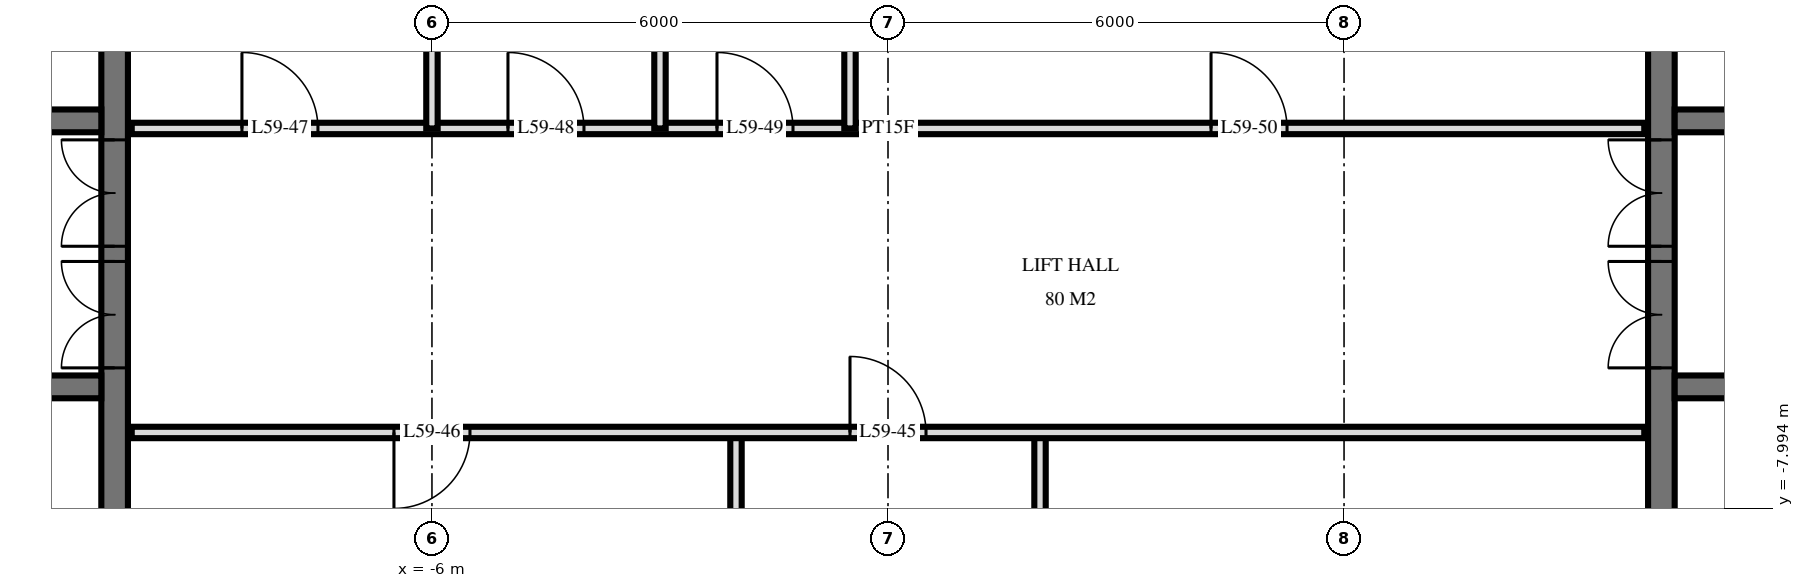
"""IFC4 building model, lengths in metres.
Left out: names, types, materials, properties, quantities, classifications, styles, units other than length and angle.
Written with IfcOpenShell. Run it as: python <this file> out.ifc"""

import sys

from ifc_helpers import new_model, si_unit, direction, frame, frame_2d, origin, place, context, subcontext, project, spatial, rectangle, extrude, element, fill, save


model = new_model("IFC4")
c1 = context("Model", 3, precision=1e-05, world=origin(), true_north=direction((0.0, 1.0)))
c2 = subcontext(c1, "Body", "Model", "MODEL_VIEW")
j1 = project(units=[si_unit("LENGTHUNIT", "METRE"), si_unit("PLANEANGLEUNIT", "RADIAN")], contexts=[c1])
p1 = place(None, origin())
s1 = spatial("IfcSite", under=j1, at=p1, CompositionType="ELEMENT")
p2 = place(p1, origin())
s2 = spatial("IfcBuilding", under=s1, at=p2, CompositionType="ELEMENT")
p3 = place(p2, frame((0.0, 0.0, 225.6)))
s3 = spatial("IfcBuildingStorey", under=s2, at=p3, CompositionType="ELEMENT", Elevation=225.6)
p4 = place(p3, frame((-10.175, -14.55, 0.0), z_axis=(0.0, 0.0, 1.0), x_axis=(0.0, 1.0, 0.0)))
e1 = element("IfcWall", 1, at=p4, inside=s3, PredefinedType="SHEAR", context=c2, shape_type="SweptSolid", body=[
    extrude(rectangle(XDim=14.1, YDim=0.35, at=frame_2d((7.05, 0.0))), origin(), (0.0, 0.0, 1.0), 3.5),
])
p5 = place(p4, frame((8.4, 0.0, 0.0)))
e2 = element("IfcOpeningElement", 2, at=p5, cuts=e1, PredefinedType="OPENING", context=c2, shape_type="SweptSolid", body=[
    extrude(rectangle(XDim=1.4, YDim=2.4, at=frame_2d((0.7, 1.2))), frame((0.0, 0.185, 0.0), z_axis=(0.0, -1.0, 0.0), x_axis=(1.0, 0.0, 0.0)), (0.0, 0.0, 1.0), 0.37),
])
p6 = place(p4, frame((10.0, 0.0, 0.0)))
e3 = element("IfcOpeningElement", 3, at=p6, cuts=e1, PredefinedType="OPENING", context=c2, shape_type="SweptSolid", body=[
    extrude(rectangle(XDim=1.4, YDim=2.4, at=frame_2d((0.7, 1.2))), frame((0.0, 0.185, 0.0), z_axis=(0.0, -1.0, 0.0), x_axis=(1.0, 0.0, 0.0)), (0.0, 0.0, 1.0), 0.37),
])
p7 = place(p4, frame((4.0, 0.0, 0.0)))
e4 = element("IfcOpeningElement", 4, at=p7, cuts=e1, PredefinedType="OPENING", context=c2, shape_type="SweptSolid", body=[
    extrude(rectangle(XDim=1.2, YDim=2.1, at=frame_2d((0.6, 1.05))), frame((0.0, 0.185, 0.0), z_axis=(0.0, -1.0, 0.0), x_axis=(1.0, 0.0, 0.0)), (0.0, 0.0, 1.0), 0.37),
])
p8 = place(p3, frame((-24.05, -2.9, 0.0), z_axis=(0.0, 0.0, 1.0), x_axis=(1.0, 0.0, 0.0)))
e5 = element("IfcWall", 5, at=p8, inside=s3, PredefinedType="SHEAR", context=c2, shape_type="SweptSolid", body=[
    extrude(rectangle(XDim=13.7, YDim=0.3, at=frame_2d((6.85, 0.0))), origin(), (0.0, 0.0, 1.0), 3.5),
])
p9 = place(p8, frame((0.55, 0.0, 0.0)))
e6 = element("IfcOpeningElement", 6, at=p9, cuts=e5, PredefinedType="OPENING", context=c2, shape_type="SweptSolid", body=[
    extrude(rectangle(XDim=1.1, YDim=2.1, at=frame_2d((0.55, 1.05))), frame((0.0, 0.16, 0.0), z_axis=(0.0, -1.0, 0.0), x_axis=(1.0, 0.0, 0.0)), (0.0, 0.0, 1.0), 0.32),
])
p10 = place(p8, frame((5.9, 0.0, 0.0)))
e7 = element("IfcOpeningElement", 7, at=p10, cuts=e5, PredefinedType="OPENING", context=c2, shape_type="SweptSolid", body=[
    extrude(rectangle(XDim=0.9, YDim=2.1, at=frame_2d((0.45, 1.05))), frame((0.0, 0.16, 0.0), z_axis=(0.0, -1.0, 0.0), x_axis=(1.0, 0.0, 0.0)), (0.0, 0.0, 1.0), 0.32),
])
p11 = place(p8, frame((11.85, 0.0, 0.0)))
e8 = element("IfcOpeningElement", 8, at=p11, cuts=e5, PredefinedType="OPENING", context=c2, shape_type="SweptSolid", body=[
    extrude(rectangle(XDim=1.0, YDim=2.1, at=frame_2d((0.5, 1.05))), frame((0.0, 0.16, 0.0), z_axis=(0.0, -1.0, 0.0), x_axis=(1.0, 0.0, 0.0)), (0.0, 0.0, 1.0), 0.32),
])
p12 = place(p8, frame((9.312, 0.0, 0.0)))
e9 = element("IfcOpeningElement", 9, at=p12, cuts=e5, PredefinedType="OPENING", context=c2, shape_type="SweptSolid", body=[
    extrude(rectangle(XDim=1.0, YDim=2.1, at=frame_2d((0.5, 1.05))), frame((0.0, 0.16, 0.0), z_axis=(0.0, -1.0, 0.0), x_axis=(1.0, 0.0, 0.0)), (0.0, 0.0, 1.0), 0.32),
])
p13 = place(p8, frame((7.887, 0.0, 0.0)))
e10 = element("IfcOpeningElement", 10, at=p13, cuts=e5, PredefinedType="OPENING", context=c2, shape_type="SweptSolid", body=[
    extrude(rectangle(XDim=1.0, YDim=2.1, at=frame_2d((0.5, 1.05))), frame((0.0, 0.16, 0.0), z_axis=(0.0, -1.0, 0.0), x_axis=(1.0, 0.0, 0.0)), (0.0, 0.0, 1.0), 0.32),
])
p14 = place(p8, frame((3.0, 0.0, 0.0)))
e11 = element("IfcOpeningElement", 11, at=p14, cuts=e5, PredefinedType="OPENING", context=c2, shape_type="SweptSolid", body=[
    extrude(rectangle(XDim=1.0, YDim=2.1, at=frame_2d((0.5, 1.05))), frame((0.0, 0.16, 0.0), z_axis=(0.0, -1.0, 0.0), x_axis=(1.0, 0.0, 0.0)), (0.0, 0.0, 1.0), 0.32),
])
p15 = place(p3, frame((-24.05, -6.4, 0.0), z_axis=(0.0, 0.0, 1.0), x_axis=(1.0, 0.0, 0.0)))
e12 = element("IfcWall", 12, at=p15, inside=s3, PredefinedType="SHEAR", context=c2, shape_type="SweptSolid", body=[
    extrude(rectangle(XDim=13.7, YDim=0.3, at=frame_2d((6.85, 0.0))), origin(), (0.0, 0.0, 1.0), 3.5),
])
p16 = place(p15, frame((0.55, 0.0, 0.0)))
e13 = element("IfcOpeningElement", 13, at=p16, cuts=e12, PredefinedType="OPENING", context=c2, shape_type="SweptSolid", body=[
    extrude(rectangle(XDim=1.1, YDim=2.1, at=frame_2d((0.55, 1.05))), frame((0.0, 0.16, 0.0), z_axis=(0.0, -1.0, 0.0), x_axis=(1.0, 0.0, 0.0)), (0.0, 0.0, 1.0), 0.32),
])
p17 = place(p15, frame((5.8, 0.0, 0.0)))
e14 = element("IfcOpeningElement", 14, at=p17, cuts=e12, PredefinedType="OPENING", context=c2, shape_type="SweptSolid", body=[
    extrude(rectangle(XDim=1.1, YDim=2.1, at=frame_2d((0.55, 1.05))), frame((0.0, 0.16, 0.0), z_axis=(0.0, -1.0, 0.0), x_axis=(1.0, 0.0, 0.0)), (0.0, 0.0, 1.0), 0.32),
])
p18 = place(p3, frame((10.175, -14.55, 0.0), z_axis=(0.0, 0.0, 1.0), x_axis=(0.0, 1.0, 0.0)))
e15 = element("IfcWall", 15, at=p18, inside=s3, PredefinedType="SHEAR", context=c2, shape_type="SweptSolid", body=[
    extrude(rectangle(XDim=14.1, YDim=0.35, at=frame_2d((7.05, 0.0))), origin(), (0.0, 0.0, 1.0), 3.5),
])
p19 = place(p18, frame((8.4, 0.0, 0.0)))
e16 = element("IfcOpeningElement", 16, at=p19, cuts=e15, PredefinedType="OPENING", context=c2, shape_type="SweptSolid", body=[
    extrude(rectangle(XDim=1.4, YDim=2.4, at=frame_2d((0.7, 1.2))), frame((0.0, 0.185, 0.0), z_axis=(0.0, -1.0, 0.0), x_axis=(1.0, 0.0, 0.0)), (0.0, 0.0, 1.0), 0.37),
])
p20 = place(p18, frame((10.0, 0.0, 0.0)))
e17 = element("IfcOpeningElement", 17, at=p20, cuts=e15, PredefinedType="OPENING", context=c2, shape_type="SweptSolid", body=[
    extrude(rectangle(XDim=1.4, YDim=2.4, at=frame_2d((0.7, 1.2))), frame((0.0, 0.185, 0.0), z_axis=(0.0, -1.0, 0.0), x_axis=(1.0, 0.0, 0.0)), (0.0, 0.0, 1.0), 0.37),
])
p21 = place(p18, frame((4.0, 0.0, 0.0)))
e18 = element("IfcOpeningElement", 18, at=p21, cuts=e15, PredefinedType="OPENING", context=c2, shape_type="SweptSolid", body=[
    extrude(rectangle(XDim=1.2, YDim=2.1, at=frame_2d((0.6, 1.05))), frame((0.0, 0.185, 0.0), z_axis=(0.0, -1.0, 0.0), x_axis=(1.0, 0.0, 0.0)), (0.0, 0.0, 1.0), 0.37),
])
p22 = place(p3, frame((10.35, -2.9, 0.0), z_axis=(0.0, 0.0, 1.0), x_axis=(1.0, 0.0, 0.0)))
e19 = element("IfcWall", 19, at=p22, inside=s3, PredefinedType="SHEAR", context=c2, shape_type="SweptSolid", body=[
    extrude(rectangle(XDim=13.7, YDim=0.3, at=frame_2d((6.85, 0.0))), origin(), (0.0, 0.0, 1.0), 3.5),
])
p23 = place(p22, frame((12.05, 0.0, 0.0)))
e20 = element("IfcOpeningElement", 20, at=p23, cuts=e19, PredefinedType="OPENING", context=c2, shape_type="SweptSolid", body=[
    extrude(rectangle(XDim=1.1, YDim=2.1, at=frame_2d((0.55, 1.05))), frame((0.0, 0.16, 0.0), z_axis=(0.0, -1.0, 0.0), x_axis=(1.0, 0.0, 0.0)), (0.0, 0.0, 1.0), 0.32),
])
p24 = place(p22, frame((6.9, 0.0, 0.0)))
e21 = element("IfcOpeningElement", 21, at=p24, cuts=e19, PredefinedType="OPENING", context=c2, shape_type="SweptSolid", body=[
    extrude(rectangle(XDim=0.9, YDim=2.1, at=frame_2d((0.45, 1.05))), frame((0.0, 0.16, 0.0), z_axis=(0.0, -1.0, 0.0), x_axis=(1.0, 0.0, 0.0)), (0.0, 0.0, 1.0), 0.32),
])
p25 = place(p22, frame((0.85, 0.0, 0.0)))
e22 = element("IfcOpeningElement", 22, at=p25, cuts=e19, PredefinedType="OPENING", context=c2, shape_type="SweptSolid", body=[
    extrude(rectangle(XDim=1.0, YDim=2.1, at=frame_2d((0.5, 1.05))), frame((0.0, 0.16, 0.0), z_axis=(0.0, -1.0, 0.0), x_axis=(1.0, 0.0, 0.0)), (0.0, 0.0, 1.0), 0.32),
])
p26 = place(p22, frame((3.387, 0.0, 0.0)))
e23 = element("IfcOpeningElement", 23, at=p26, cuts=e19, PredefinedType="OPENING", context=c2, shape_type="SweptSolid", body=[
    extrude(rectangle(XDim=1.0, YDim=2.1, at=frame_2d((0.5, 1.05))), frame((0.0, 0.16, 0.0), z_axis=(0.0, -1.0, 0.0), x_axis=(1.0, 0.0, 0.0)), (0.0, 0.0, 1.0), 0.32),
])
p27 = place(p22, frame((4.812, 0.0, 0.0)))
e24 = element("IfcOpeningElement", 24, at=p27, cuts=e19, PredefinedType="OPENING", context=c2, shape_type="SweptSolid", body=[
    extrude(rectangle(XDim=1.0, YDim=2.1, at=frame_2d((0.5, 1.05))), frame((0.0, 0.16, 0.0), z_axis=(0.0, -1.0, 0.0), x_axis=(1.0, 0.0, 0.0)), (0.0, 0.0, 1.0), 0.32),
])
p28 = place(p22, frame((9.7, 0.0, 0.0)))
e25 = element("IfcOpeningElement", 25, at=p28, cuts=e19, PredefinedType="OPENING", context=c2, shape_type="SweptSolid", body=[
    extrude(rectangle(XDim=1.0, YDim=2.1, at=frame_2d((0.5, 1.05))), frame((0.0, 0.16, 0.0), z_axis=(0.0, -1.0, 0.0), x_axis=(1.0, 0.0, 0.0)), (0.0, 0.0, 1.0), 0.32),
])
p29 = place(p3, frame((10.35, -6.4, 0.0), z_axis=(0.0, 0.0, 1.0), x_axis=(1.0, 0.0, 0.0)))
e26 = element("IfcWall", 26, at=p29, inside=s3, PredefinedType="SHEAR", context=c2, shape_type="SweptSolid", body=[
    extrude(rectangle(XDim=13.7, YDim=0.3, at=frame_2d((6.85, 0.0))), origin(), (0.0, 0.0, 1.0), 3.5),
])
p30 = place(p29, frame((12.05, 0.0, 0.0)))
e27 = element("IfcOpeningElement", 27, at=p30, cuts=e26, PredefinedType="OPENING", context=c2, shape_type="SweptSolid", body=[
    extrude(rectangle(XDim=1.1, YDim=2.1, at=frame_2d((0.55, 1.05))), frame((0.0, 0.16, 0.0), z_axis=(0.0, -1.0, 0.0), x_axis=(1.0, 0.0, 0.0)), (0.0, 0.0, 1.0), 0.32),
])
p31 = place(p29, frame((6.8, 0.0, 0.0)))
e28 = element("IfcOpeningElement", 28, at=p31, cuts=e26, PredefinedType="OPENING", context=c2, shape_type="SweptSolid", body=[
    extrude(rectangle(XDim=1.1, YDim=2.1, at=frame_2d((0.55, 1.05))), frame((0.0, 0.16, 0.0), z_axis=(0.0, -1.0, 0.0), x_axis=(1.0, 0.0, 0.0)), (0.0, 0.0, 1.0), 0.32),
])
p32 = place(p3, frame((2.0, -11.0, 0.0), z_axis=(0.0, 0.0, 1.0), x_axis=(0.0, 1.0, 0.0)))
e29 = element("IfcWall", 29, at=p32, inside=s3, PredefinedType="PARTITIONING", context=c2, shape_type="SweptSolid", body=[
    extrude(rectangle(XDim=4.0, YDim=0.15, at=frame_2d((2.0, 0.0))), origin(), (0.0, 0.0, 1.0), 3.22),
])
p33 = place(p3, frame((-0.5, -3.0, 0.0), z_axis=(0.0, 0.0, 1.0), x_axis=(0.0, 1.0, 0.0)))
e30 = element("IfcWall", 30, at=p33, inside=s3, PredefinedType="PLUMBINGWALL", context=c2, shape_type="SweptSolid", body=[
    extrude(rectangle(XDim=4.02, YDim=0.15, at=frame_2d((2.01, 0.0))), origin(), (0.0, 0.0, 1.0), 3.22),
])
p34 = place(p3, frame((-2.0, -11.0, 0.0), z_axis=(0.0, 0.0, 1.0), x_axis=(0.0, 1.0, 0.0)))
e31 = element("IfcWall", 31, at=p34, inside=s3, PredefinedType="PARTITIONING", context=c2, shape_type="SweptSolid", body=[
    extrude(rectangle(XDim=4.0, YDim=0.15, at=frame_2d((2.0, 0.0))), origin(), (0.0, 0.0, 1.0), 3.22),
])
for number, where, z_axis, x_axis in (
    (32, (-3.0, -3.0, 0.0), (0.0, 0.0, 1.0), (0.0, 1.0, 0.0)),
    (33, (-6.0, -3.0, 0.0), (0.0, 0.0, 1.0), (0.0, 1.0, 0.0)),
):
    element("IfcWall", number, at=place(p3, frame(where, z_axis=z_axis, x_axis=x_axis)), inside=s3, PredefinedType="PLUMBINGWALL", context=c2, shape_type="SweptSolid", body=[
        extrude(rectangle(XDim=4.02, YDim=0.15, at=frame_2d((2.01, 0.0))), origin(), (0.0, 0.0, 1.0), 3.22),
    ])
p35 = place(p3, frame((-9.95, -7.0, 0.0), z_axis=(0.0, 0.0, 1.0), x_axis=(1.0, 0.0, 0.0)))
e34 = element("IfcWall", 34, at=p35, inside=s3, PredefinedType="PARTITIONING", context=c2, shape_type="SweptSolid", body=[
    extrude(rectangle(XDim=19.9, YDim=0.15, at=frame_2d((9.95, 0.0))), origin(), (0.0, 0.0, 1.0), 3.22),
])
p36 = place(p35, frame((9.45, 0.0, 0.0)))
e35 = element("IfcOpeningElement", 35, at=p36, cuts=e34, PredefinedType="OPENING", context=c2, shape_type="SweptSolid", body=[
    extrude(rectangle(XDim=1.0, YDim=2.1, at=frame_2d((0.5, 1.05))), frame((0.0, 0.085, 0.0), z_axis=(0.0, -1.0, 0.0), x_axis=(1.0, 0.0, 0.0)), (0.0, 0.0, 1.0), 0.17),
])
p37 = place(p35, frame((3.45, 0.0, 0.0)))
e36 = element("IfcOpeningElement", 36, at=p37, cuts=e34, PredefinedType="OPENING", context=c2, shape_type="SweptSolid", body=[
    extrude(rectangle(XDim=1.0, YDim=2.1, at=frame_2d((0.5, 1.05))), frame((0.0, 0.085, 0.0), z_axis=(0.0, -1.0, 0.0), x_axis=(1.0, 0.0, 0.0)), (0.0, 0.0, 1.0), 0.17),
])
p38 = place(p3, frame((-9.95, -3.0, 0.0), z_axis=(0.0, 0.0, 1.0), x_axis=(1.0, 0.0, 0.0)))
e37 = element("IfcWall", 37, at=p38, inside=s3, PredefinedType="PARTITIONING", context=c2, shape_type="SweptSolid", body=[
    extrude(rectangle(XDim=19.9, YDim=0.15, at=frame_2d((9.95, 0.0))), origin(), (0.0, 0.0, 1.0), 3.22),
])
p39 = place(p38, frame((1.45, 0.0, 0.0)))
e38 = element("IfcOpeningElement", 38, at=p39, cuts=e37, PredefinedType="OPENING", context=c2, shape_type="SweptSolid", body=[
    extrude(rectangle(XDim=1.0, YDim=2.1, at=frame_2d((0.5, 1.05))), frame((0.0, 0.085, 0.0), z_axis=(0.0, -1.0, 0.0), x_axis=(1.0, 0.0, 0.0)), (0.0, 0.0, 1.0), 0.17),
])
p40 = place(p38, frame((4.95, 0.0, 0.0)))
e39 = element("IfcOpeningElement", 39, at=p40, cuts=e37, PredefinedType="OPENING", context=c2, shape_type="SweptSolid", body=[
    extrude(rectangle(XDim=1.0, YDim=2.1, at=frame_2d((0.5, 1.05))), frame((0.0, 0.085, 0.0), z_axis=(0.0, -1.0, 0.0), x_axis=(1.0, 0.0, 0.0)), (0.0, 0.0, 1.0), 0.17),
])
p41 = place(p38, frame((7.7, 0.0, 0.0)))
e40 = element("IfcOpeningElement", 40, at=p41, cuts=e37, PredefinedType="OPENING", context=c2, shape_type="SweptSolid", body=[
    extrude(rectangle(XDim=1.0, YDim=2.1, at=frame_2d((0.5, 1.05))), frame((0.0, 0.085, 0.0), z_axis=(0.0, -1.0, 0.0), x_axis=(1.0, 0.0, 0.0)), (0.0, 0.0, 1.0), 0.17),
])
p42 = place(p38, frame((14.2, 0.0, 0.0)))
e41 = element("IfcOpeningElement", 41, at=p42, cuts=e37, PredefinedType="OPENING", context=c2, shape_type="SweptSolid", body=[
    extrude(rectangle(XDim=1.0, YDim=2.1, at=frame_2d((0.5, 1.05))), frame((0.0, 0.085, 0.0), z_axis=(0.0, -1.0, 0.0), x_axis=(1.0, 0.0, 0.0)), (0.0, 0.0, 1.0), 0.17),
])
p43 = place(p5, origin())
e42 = element("IfcDoor", 42, at=p43, inside=s3, OperationType="DOUBLE_DOOR_SINGLE_SWING", PredefinedType="DOOR", context=c2, shape_type="SweptSolid", body=[
    extrude(rectangle(XDim=1.4, YDim=2.4, at=frame_2d((0.7, 1.2))), frame((0.0, 0.025, 0.0), z_axis=(0.0, -1.0, 0.0), x_axis=(1.0, 0.0, 0.0)), (0.0, 0.0, 1.0), 0.05),
])
fill(e2, e42)
p44 = place(p6, origin())
e43 = element("IfcDoor", 43, at=p44, inside=s3, OperationType="DOUBLE_DOOR_SINGLE_SWING", PredefinedType="DOOR", context=c2, shape_type="SweptSolid", body=[
    extrude(rectangle(XDim=1.4, YDim=2.4, at=frame_2d((0.7, 1.2))), frame((0.0, 0.025, 0.0), z_axis=(0.0, -1.0, 0.0), x_axis=(1.0, 0.0, 0.0)), (0.0, 0.0, 1.0), 0.05),
])
fill(e3, e43)
p45 = place(p19, origin())
e44 = element("IfcDoor", 44, at=p45, inside=s3, OperationType="DOUBLE_DOOR_SINGLE_SWING", PredefinedType="DOOR", context=c2, shape_type="SweptSolid", body=[
    extrude(rectangle(XDim=1.4, YDim=2.4, at=frame_2d((0.7, 1.2))), frame((0.0, 0.025, 0.0), z_axis=(0.0, -1.0, 0.0), x_axis=(1.0, 0.0, 0.0)), (0.0, 0.0, 1.0), 0.05),
])
fill(e16, e44)
p46 = place(p20, origin())
e45 = element("IfcDoor", 45, at=p46, inside=s3, OperationType="DOUBLE_DOOR_SINGLE_SWING", PredefinedType="DOOR", context=c2, shape_type="SweptSolid", body=[
    extrude(rectangle(XDim=1.4, YDim=2.4, at=frame_2d((0.7, 1.2))), frame((0.0, 0.025, 0.0), z_axis=(0.0, -1.0, 0.0), x_axis=(1.0, 0.0, 0.0)), (0.0, 0.0, 1.0), 0.05),
])
fill(e17, e45)
p47 = place(p36, origin())
e46 = element("IfcDoor", 46, at=p47, inside=s3, OperationType="SINGLE_SWING_RIGHT", PredefinedType="DOOR", context=c2, shape_type="SweptSolid", body=[
    extrude(rectangle(XDim=1.0, YDim=2.1, at=frame_2d((0.5, 1.05))), frame((0.0, 0.025, 0.0), z_axis=(0.0, -1.0, 0.0), x_axis=(1.0, 0.0, 0.0)), (0.0, 0.0, 1.0), 0.05),
])
fill(e35, e46)
p48 = place(p37, frame((0.5, 0.0, 0.0), z_axis=(0.0, 0.0, 1.0), x_axis=(-1.0, 0.0, 0.0)))
e47 = element("IfcDoor", 47, at=p48, inside=s3, OperationType="SINGLE_SWING_LEFT", PredefinedType="DOOR", context=c2, shape_type="SweptSolid", body=[
    extrude(rectangle(XDim=1.0, YDim=2.1, at=frame_2d((0.0, 1.05))), frame((0.0, -0.025, 0.0), z_axis=(0.0, 1.0, 0.0), x_axis=(-1.0, 0.0, 0.0)), (0.0, 0.0, 1.0), 0.05),
])
fill(e36, e47)
p49 = place(p39, origin())
e48 = element("IfcDoor", 48, at=p49, inside=s3, OperationType="SINGLE_SWING_RIGHT", PredefinedType="DOOR", context=c2, shape_type="SweptSolid", body=[
    extrude(rectangle(XDim=1.0, YDim=2.1, at=frame_2d((0.5, 1.05))), frame((0.0, 0.025, 0.0), z_axis=(0.0, -1.0, 0.0), x_axis=(1.0, 0.0, 0.0)), (0.0, 0.0, 1.0), 0.05),
])
fill(e38, e48)
p50 = place(p40, origin())
e49 = element("IfcDoor", 49, at=p50, inside=s3, OperationType="SINGLE_SWING_RIGHT", PredefinedType="DOOR", context=c2, shape_type="SweptSolid", body=[
    extrude(rectangle(XDim=1.0, YDim=2.1, at=frame_2d((0.5, 1.05))), frame((0.0, 0.025, 0.0), z_axis=(0.0, -1.0, 0.0), x_axis=(1.0, 0.0, 0.0)), (0.0, 0.0, 1.0), 0.05),
])
fill(e39, e49)
p51 = place(p41, origin())
e50 = element("IfcDoor", 50, at=p51, inside=s3, OperationType="SINGLE_SWING_RIGHT", PredefinedType="DOOR", context=c2, shape_type="SweptSolid", body=[
    extrude(rectangle(XDim=1.0, YDim=2.1, at=frame_2d((0.5, 1.05))), frame((0.0, 0.025, 0.0), z_axis=(0.0, -1.0, 0.0), x_axis=(1.0, 0.0, 0.0)), (0.0, 0.0, 1.0), 0.05),
])
fill(e40, e50)
p52 = place(p42, origin())
e51 = element("IfcDoor", 51, at=p52, inside=s3, OperationType="SINGLE_SWING_RIGHT", PredefinedType="DOOR", context=c2, shape_type="SweptSolid", body=[
    extrude(rectangle(XDim=1.0, YDim=2.1, at=frame_2d((0.5, 1.05))), frame((0.0, 0.025, 0.0), z_axis=(0.0, -1.0, 0.0), x_axis=(1.0, 0.0, 0.0)), (0.0, 0.0, 1.0), 0.05),
])
fill(e41, e51)
save(model, sys.argv[1])
